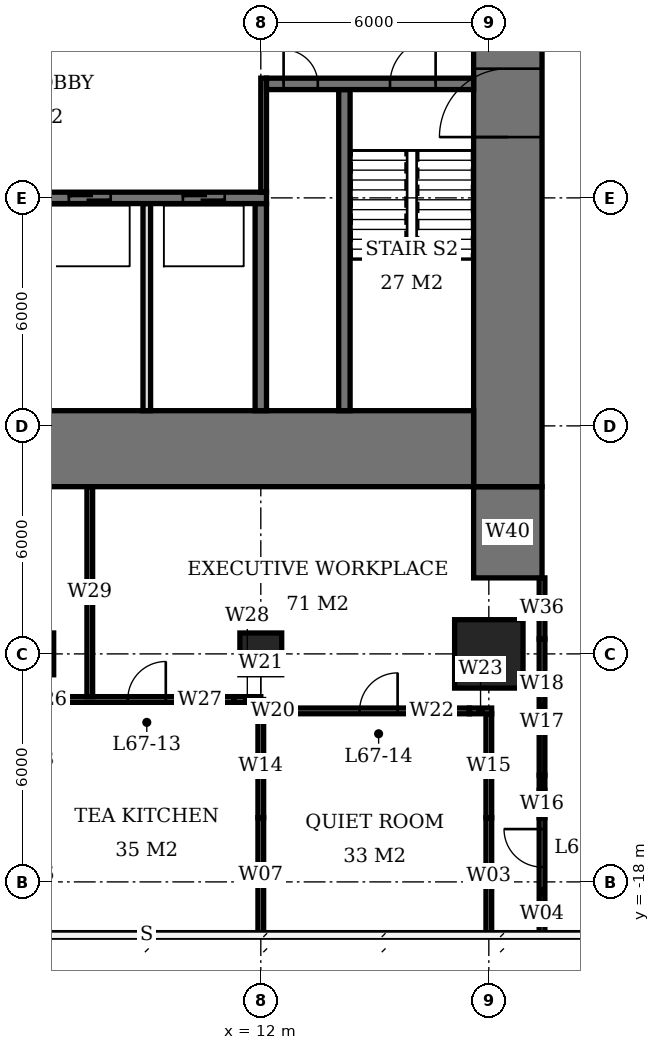
"""IFC4 building model, lengths in metres.
Left out: names, types, materials, properties, quantities, classifications, styles, units other than length and angle.
Written with IfcOpenShell. Run it as: python <this file> out.ifc"""

import sys

from ifc_helpers import new_model, si_unit, direction, frame, frame_2d, origin, origin_2d, place, context, subcontext, project, spatial, rectangle, extrude, element, fill, save


model = new_model("IFC4")
c1 = context("Model", 3, precision=1e-05, world=origin(), true_north=direction((0.0, 1.0)))
c2 = subcontext(c1, "Body", "Model", "MODEL_VIEW")
j1 = project(units=[si_unit("LENGTHUNIT", "METRE"), si_unit("PLANEANGLEUNIT", "RADIAN")], contexts=[c1])
p1 = place(None, origin())
s1 = spatial("IfcSite", under=j1, at=p1, CompositionType="ELEMENT")
p2 = place(p1, origin())
s2 = spatial("IfcBuilding", under=s1, at=p2, CompositionType="ELEMENT")
p3 = place(p2, frame((0.0, 0.0, 272.3)))
s3 = spatial("IfcBuildingStorey", under=s2, at=p3, CompositionType="ELEMENT", Elevation=272.3)
for number, where, z_axis, x_axis in (
    (1, (6.0, -12.0, 0.0), (0.0, 0.0, 1.0), (1.0, 0.0, 0.0)),
    (2, (12.0, -12.0, 0.0), (0.0, 0.0, 1.0), (1.0, 0.0, 0.0)),
):
    element("IfcColumn", number, at=place(p3, frame(where, z_axis=z_axis, x_axis=x_axis)), inside=s3, PredefinedType="COLUMN", context=c2, shape_type="SweptSolid", body=[
        extrude(rectangle(XDim=1.1, YDim=1.1, at=origin_2d()), origin(), (0.0, 0.0, 1.0), 3.9),
    ])
p4 = place(p3, frame((18.0, -12.0, 0.0), z_axis=(0.0, 0.0, 1.0), x_axis=(1.0, 0.0, 0.0)))
e3 = element("IfcColumn", 3, at=p4, inside=s3, PredefinedType="COLUMN", context=c2, shape_type="SweptSolid", body=[
    extrude(rectangle(XDim=1.8, YDim=1.8, at=origin_2d()), origin(), (0.0, 0.0, 1.0), 3.9),
])
p5 = place(p3, frame((-5.6, -6.6, 0.0), z_axis=(0.0, 0.0, 1.0), x_axis=(1.0, 0.0, 0.0)))
e4 = element("IfcWall", 4, at=p5, inside=s3, PredefinedType="SHEAR", context=c2, shape_type="SweptSolid", body=[
    extrude(rectangle(XDim=23.2, YDim=2.0, at=frame_2d((11.6, 0.0))), origin(), (0.0, 0.0, 1.0), 3.9),
])
p6 = place(p3, frame((18.5, -7.6, 0.0), z_axis=(0.0, 0.0, 1.0), x_axis=(0.0, 1.0, 0.0)))
e5 = element("IfcWall", 5, at=p6, inside=s3, PredefinedType="SHEAR", context=c2, shape_type="SweptSolid", body=[
    extrude(rectangle(XDim=21.2, YDim=1.8, at=frame_2d((10.6, 0.0))), origin(), (0.0, 0.0, 1.0), 3.9),
])
p7 = place(p6, frame((9.2, 0.0, 0.0)))
e6 = element("IfcOpeningElement", 6, at=p7, cuts=e5, PredefinedType="OPENING", context=c2, shape_type="SweptSolid", body=[
    extrude(rectangle(XDim=1.8, YDim=2.4, at=frame_2d((0.9, 1.2))), frame((0.0, 0.91, 0.0), z_axis=(0.0, -1.0, 0.0), x_axis=(1.0, 0.0, 0.0)), (0.0, 0.0, 1.0), 1.82),
])
p8 = place(p3, frame((18.5, -10.0, 0.0), z_axis=(0.0, 0.0, 1.0), x_axis=(0.0, 1.0, 0.0)))
e7 = element("IfcWall", 7, at=p8, inside=s3, PredefinedType="SHEAR", context=c2, shape_type="SweptSolid", body=[
    extrude(rectangle(XDim=2.4, YDim=1.8, at=frame_2d((1.2, 0.0))), origin(), (0.0, 0.0, 1.0), 3.9),
])
p9 = place(p3, frame((-5.6, 0.0, 0.0), z_axis=(0.0, 0.0, 1.0), x_axis=(1.0, 0.0, 0.0)))
e8 = element("IfcWall", 8, at=p9, inside=s3, PredefinedType="SHEAR", context=c2, shape_type="SweptSolid", body=[
    extrude(rectangle(XDim=17.75, YDim=0.3, at=frame_2d((8.875, 0.0))), origin(), (0.0, 0.0, 1.0), 3.9),
])
p10 = place(p9, frame((0.6, 0.0, 0.0)))
e9 = element("IfcOpeningElement", 9, at=p10, cuts=e8, PredefinedType="OPENING", context=c2, shape_type="SweptSolid", body=[
    extrude(rectangle(XDim=0.9, YDim=2.1, at=frame_2d((0.45, 1.05))), frame((0.0, 0.16, 0.0), z_axis=(0.0, -1.0, 0.0), x_axis=(1.0, 0.0, 0.0)), (0.0, 0.0, 1.0), 0.32),
])
p11 = place(p9, frame((9.6, 0.0, 0.0)))
e10 = element("IfcOpeningElement", 10, at=p11, cuts=e8, PredefinedType="OPENING", context=c2, shape_type="SweptSolid", body=[
    extrude(rectangle(XDim=1.0, YDim=2.1, at=frame_2d((0.5, 1.05))), frame((0.0, 0.16, 0.0), z_axis=(0.0, -1.0, 0.0), x_axis=(1.0, 0.0, 0.0)), (0.0, 0.0, 1.0), 0.32),
])
p12 = place(p9, frame((12.55, 0.0, 0.0)))
e11 = element("IfcOpeningElement", 11, at=p12, cuts=e8, PredefinedType="OPENING", context=c2, shape_type="SweptSolid", body=[
    extrude(rectangle(XDim=1.1, YDim=2.1, at=frame_2d((0.55, 1.05))), frame((0.0, 0.16, 0.0), z_axis=(0.0, -1.0, 0.0), x_axis=(1.0, 0.0, 0.0)), (0.0, 0.0, 1.0), 0.32),
])
p13 = place(p9, frame((15.55, 0.0, 0.0)))
e12 = element("IfcOpeningElement", 12, at=p13, cuts=e8, PredefinedType="OPENING", context=c2, shape_type="SweptSolid", body=[
    extrude(rectangle(XDim=1.1, YDim=2.1, at=frame_2d((0.55, 1.05))), frame((0.0, 0.16, 0.0), z_axis=(0.0, -1.0, 0.0), x_axis=(1.0, 0.0, 0.0)), (0.0, 0.0, 1.0), 0.32),
])
p14 = place(p3, frame((12.15, 3.0, 0.0), z_axis=(0.0, 0.0, 1.0), x_axis=(1.0, 0.0, 0.0)))
e13 = element("IfcWall", 13, at=p14, inside=s3, PredefinedType="SHEAR", context=c2, shape_type="SweptSolid", body=[
    extrude(rectangle(XDim=5.45, YDim=0.3, at=frame_2d((2.725, 0.0))), origin(), (0.0, 0.0, 1.0), 3.9),
])
p15 = place(p14, frame((3.25, 0.0, 0.0)))
e14 = element("IfcOpeningElement", 14, at=p15, cuts=e13, PredefinedType="OPENING", context=c2, shape_type="SweptSolid", body=[
    extrude(rectangle(XDim=1.2, YDim=2.1, at=frame_2d((0.6, 1.05))), frame((0.0, 0.16, 0.0), z_axis=(0.0, -1.0, 0.0), x_axis=(1.0, 0.0, 0.0)), (0.0, 0.0, 1.0), 0.32),
])
p16 = place(p14, frame((0.45, 0.0, 0.0)))
e15 = element("IfcOpeningElement", 15, at=p16, cuts=e13, PredefinedType="OPENING", context=c2, shape_type="SweptSolid", body=[
    extrude(rectangle(XDim=0.9, YDim=2.1, at=frame_2d((0.45, 1.05))), frame((0.0, 0.16, 0.0), z_axis=(0.0, -1.0, 0.0), x_axis=(1.0, 0.0, 0.0)), (0.0, 0.0, 1.0), 0.32),
])
p17 = place(p3, frame((12.0, -5.6, 0.0), z_axis=(0.0, 0.0, 1.0), x_axis=(0.0, 1.0, 0.0)))
e16 = element("IfcWall", 16, at=p17, inside=s3, PredefinedType="SHEAR", context=c2, shape_type="SweptSolid", body=[
    extrude(rectangle(XDim=5.45, YDim=0.3, at=frame_2d((2.725, 0.0))), origin(), (0.0, 0.0, 1.0), 3.9),
])
p18 = place(p3, frame((14.2, -5.6, 0.0), z_axis=(0.0, 0.0, 1.0), x_axis=(0.0, 1.0, 0.0)))
e17 = element("IfcWall", 17, at=p18, inside=s3, PredefinedType="SHEAR", context=c2, shape_type="SweptSolid", body=[
    extrude(rectangle(XDim=8.45, YDim=0.3, at=frame_2d((4.225, 0.0))), origin(), (0.0, 0.0, 1.0), 3.9),
])
p19 = place(p3, frame((9.0, -5.6, 0.0), z_axis=(0.0, 0.0, 1.0), x_axis=(0.0, 1.0, 0.0)))
e18 = element("IfcWall", 18, at=p19, inside=s3, PredefinedType="SOLIDWALL", context=c2, shape_type="SweptSolid", body=[
    extrude(rectangle(XDim=5.45, YDim=0.2, at=frame_2d((2.725, 0.0))), origin(), (0.0, 0.0, 1.0), 3.9),
])
p20 = place(p3, frame((11.925, -13.5, 0.0), z_axis=(0.0, 0.0, 1.0), x_axis=(1.0, 0.0, 0.0)))
e19 = element("IfcWall", 19, at=p20, inside=s3, PredefinedType="PARTITIONING", context=c2, shape_type="SweptSolid", body=[
    extrude(rectangle(XDim=0.785, YDim=0.15, at=frame_2d((0.393, 0.0))), origin(), (0.0, 0.0, 1.0), 2.65),
])
p21 = place(p3, frame((12.71, -13.5, 0.0), z_axis=(0.0, 0.0, 1.0), x_axis=(1.0, 0.0, 0.0)))
e20 = element("IfcWall", 20, at=p21, inside=s3, PredefinedType="PARTITIONING", context=c2, shape_type="SweptSolid", body=[
    extrude(rectangle(XDim=4.78, YDim=0.15, at=frame_2d((2.39, 0.0))), origin(), (0.0, 0.0, 1.0), 3.65),
])
p22 = place(p21, frame((1.89, 0.0, 0.0)))
e21 = element("IfcOpeningElement", 21, at=p22, cuts=e20, PredefinedType="OPENING", context=c2, shape_type="SweptSolid", body=[
    extrude(rectangle(XDim=1.0, YDim=2.4, at=frame_2d((0.5, 1.2))), frame((0.0, 0.085, 0.0), z_axis=(0.0, -1.0, 0.0), x_axis=(1.0, 0.0, 0.0)), (0.0, 0.0, 1.0), 0.17),
])
p23 = place(p3, frame((17.49, -13.5, 0.0), z_axis=(0.0, 0.0, 1.0), x_axis=(1.0, 0.0, 0.0)))
e22 = element("IfcWall", 22, at=p23, inside=s3, PredefinedType="PARTITIONING", context=c2, shape_type="SweptSolid", body=[
    extrude(rectangle(XDim=0.585, YDim=0.15, at=frame_2d((0.292, 0.0))), origin(), (0.0, 0.0, 1.0), 2.65),
])
p24 = place(p3, frame((5.925, -13.2, 0.0), z_axis=(0.0, 0.0, 1.0), x_axis=(1.0, 0.0, 0.0)))
e23 = element("IfcWall", 23, at=p24, inside=s3, PredefinedType="PARTITIONING", context=c2, shape_type="SweptSolid", body=[
    extrude(rectangle(XDim=0.785, YDim=0.15, at=frame_2d((0.393, 0.0))), origin(), (0.0, 0.0, 1.0), 2.65),
])
p25 = place(p3, frame((6.71, -13.2, 0.0), z_axis=(0.0, 0.0, 1.0), x_axis=(1.0, 0.0, 0.0)))
e24 = element("IfcWall", 24, at=p25, inside=s3, PredefinedType="PARTITIONING", context=c2, shape_type="SweptSolid", body=[
    extrude(rectangle(XDim=4.58, YDim=0.15, at=frame_2d((2.29, 0.0))), origin(), (0.0, 0.0, 1.0), 3.65),
])
p26 = place(p25, frame((1.79, 0.0, 0.0)))
e25 = element("IfcOpeningElement", 25, at=p26, cuts=e24, PredefinedType="OPENING", context=c2, shape_type="SweptSolid", body=[
    extrude(rectangle(XDim=1.0, YDim=2.4, at=frame_2d((0.5, 1.2))), frame((0.0, 0.085, 0.0), z_axis=(0.0, -1.0, 0.0), x_axis=(1.0, 0.0, 0.0)), (0.0, 0.0, 1.0), 0.17),
])
p27 = place(p3, frame((11.29, -13.2, 0.0), z_axis=(0.0, 0.0, 1.0), x_axis=(1.0, 0.0, 0.0)))
e26 = element("IfcWall", 26, at=p27, inside=s3, PredefinedType="PARTITIONING", context=c2, shape_type="SweptSolid", body=[
    extrude(rectangle(XDim=0.71, YDim=0.15, at=frame_2d((0.355, 0.0))), origin(), (0.0, 0.0, 1.0), 2.65),
])
p28 = place(p3, frame((12.0, -19.35, 0.0), z_axis=(0.0, 0.0, 1.0), x_axis=(0.0, 1.0, 0.0)))
e27 = element("IfcWall", 27, at=p28, inside=s3, PredefinedType="PARTITIONING", context=c2, shape_type="SweptSolid", body=[
    extrude(rectangle(XDim=3.04, YDim=0.15, at=frame_2d((1.52, 0.0))), origin(), (0.0, 0.0, 1.0), 3.65),
])
p29 = place(p3, frame((12.0, -16.31, 0.0), z_axis=(0.0, 0.0, 1.0), x_axis=(0.0, 1.0, 0.0)))
e28 = element("IfcWall", 28, at=p29, inside=s3, PredefinedType="PARTITIONING", context=c2, shape_type="SweptSolid", body=[
    extrude(rectangle(XDim=2.735, YDim=0.15, at=frame_2d((1.368, 0.0))), origin(), (0.0, 0.0, 1.0), 2.65),
])
p30 = place(p3, frame((12.0, -13.5, 0.0), z_axis=(0.0, 0.0, 1.0), x_axis=(0.0, 1.0, 0.0)))
e29 = element("IfcWall", 29, at=p30, inside=s3, PredefinedType="PARTITIONING", context=c2, shape_type="SweptSolid", body=[
    extrude(rectangle(XDim=0.3, YDim=0.15, at=frame_2d((0.15, 0.0))), origin(), (0.0, 0.0, 1.0), 2.65),
])
p31 = place(p3, frame((18.0, -19.375, 0.0), z_axis=(0.0, 0.0, 1.0), x_axis=(0.0, 1.0, 0.0)))
e30 = element("IfcWall", 30, at=p31, inside=s3, PredefinedType="PARTITIONING", context=c2, shape_type="SweptSolid", body=[
    extrude(rectangle(XDim=3.065, YDim=0.15, at=frame_2d((1.532, 0.0))), origin(), (0.0, 0.0, 1.0), 3.65),
])
p32 = place(p3, frame((18.0, -16.31, 0.0), z_axis=(0.0, 0.0, 1.0), x_axis=(0.0, 1.0, 0.0)))
e31 = element("IfcWall", 31, at=p32, inside=s3, PredefinedType="PARTITIONING", context=c2, shape_type="SweptSolid", body=[
    extrude(rectangle(XDim=2.735, YDim=0.15, at=frame_2d((1.368, 0.0))), origin(), (0.0, 0.0, 1.0), 2.65),
])
p33 = place(p3, frame((7.5, -13.125, 0.0), z_axis=(0.0, 0.0, 1.0), x_axis=(0.0, 1.0, 0.0)))
e32 = element("IfcWall", 32, at=p33, inside=s3, PredefinedType="PARTITIONING", context=c2, shape_type="SweptSolid", body=[
    extrude(rectangle(XDim=5.525, YDim=0.15, at=frame_2d((2.762, 0.0))), origin(), (0.0, 0.0, 1.0), 3.65),
])
p34 = place(p3, frame((19.4, -19.375, 0.0), z_axis=(0.0, 0.0, 1.0), x_axis=(0.0, 1.0, 0.0)))
e33 = element("IfcWall", 33, at=p34, inside=s3, PredefinedType="PARTITIONING", context=c2, shape_type="SweptSolid", body=[
    extrude(rectangle(XDim=3.065, YDim=0.15, at=frame_2d((1.532, 0.0))), origin(), (0.0, 0.0, 1.0), 3.65),
])
p35 = place(p34, frame((1.765, 0.0, 0.0)))
e34 = element("IfcOpeningElement", 34, at=p35, cuts=e33, PredefinedType="OPENING", context=c2, shape_type="SweptSolid", body=[
    extrude(rectangle(XDim=1.0, YDim=2.4, at=frame_2d((0.5, 1.2))), frame((0.0, 0.085, 0.0), z_axis=(0.0, -1.0, 0.0), x_axis=(1.0, 0.0, 0.0)), (0.0, 0.0, 1.0), 0.17),
])
p36 = place(p3, frame((19.4, -16.31, 0.0), z_axis=(0.0, 0.0, 1.0), x_axis=(0.0, 1.0, 0.0)))
e35 = element("IfcWall", 35, at=p36, inside=s3, PredefinedType="PARTITIONING", context=c2, shape_type="SweptSolid", body=[
    extrude(rectangle(XDim=0.72, YDim=0.15, at=frame_2d((0.36, 0.0))), origin(), (0.0, 0.0, 1.0), 2.65),
])
p37 = place(p3, frame((19.4, -15.59, 0.0), z_axis=(0.0, 0.0, 1.0), x_axis=(0.0, 1.0, 0.0)))
e36 = element("IfcWall", 36, at=p37, inside=s3, PredefinedType="PARTITIONING", context=c2, shape_type="SweptSolid", body=[
    extrude(rectangle(XDim=0.398, YDim=0.15, at=frame_2d((0.199, 0.0))), origin(), (0.0, 0.0, 1.0), 3.65),
])
p38 = place(p3, frame((19.4, -15.192, 0.0), z_axis=(0.0, 0.0, 1.0), x_axis=(0.0, 1.0, 0.0)))
e37 = element("IfcWall", 37, at=p38, inside=s3, PredefinedType="PARTITIONING", context=c2, shape_type="SweptSolid", body=[
    extrude(rectangle(XDim=3.584, YDim=0.15, at=frame_2d((1.792, 0.0))), origin(), (0.0, 0.0, 1.0), 2.65),
])
p39 = place(p3, frame((19.4, -11.608, 0.0), z_axis=(0.0, 0.0, 1.0), x_axis=(0.0, 1.0, 0.0)))
e38 = element("IfcWall", 38, at=p39, inside=s3, PredefinedType="PARTITIONING", context=c2, shape_type="SweptSolid", body=[
    extrude(rectangle(XDim=1.608, YDim=0.15, at=frame_2d((0.804, 0.0))), origin(), (0.0, 0.0, 1.0), 3.65),
])
p40 = place(p3, frame((12.075, 0.15, 0.0), z_axis=(0.0, 0.0, 1.0), x_axis=(0.0, 1.0, 0.0)))
e39 = element("IfcWall", 39, at=p40, inside=s3, PredefinedType="PARTITIONING", context=c2, shape_type="SweptSolid", body=[
    extrude(rectangle(XDim=3.0, YDim=0.15, at=frame_2d((1.5, 0.0))), origin(), (0.0, 0.0, 1.0), 3.65),
])
p41 = place(p7, origin())
e40 = element("IfcDoor", 40, at=p41, inside=s3, OperationType="DOUBLE_DOOR_SINGLE_SWING", PredefinedType="DOOR", context=c2, shape_type="SweptSolid", body=[
    extrude(rectangle(XDim=1.8, YDim=2.4, at=frame_2d((0.9, 1.2))), frame((0.0, 0.025, 0.0), z_axis=(0.0, -1.0, 0.0), x_axis=(1.0, 0.0, 0.0)), (0.0, 0.0, 1.0), 0.05),
])
fill(e6, e40)
p42 = place(p15, origin())
e41 = element("IfcDoor", 41, at=p42, inside=s3, OperationType="SINGLE_SWING_RIGHT", PredefinedType="DOOR", context=c2, shape_type="SweptSolid", body=[
    extrude(rectangle(XDim=1.2, YDim=2.1, at=frame_2d((0.6, 1.05))), frame((0.0, 0.025, 0.0), z_axis=(0.0, -1.0, 0.0), x_axis=(1.0, 0.0, 0.0)), (0.0, 0.0, 1.0), 0.05),
])
fill(e14, e41)
p43 = place(p16, origin())
e42 = element("IfcDoor", 42, at=p43, inside=s3, OperationType="SINGLE_SWING_LEFT", PredefinedType="DOOR", context=c2, shape_type="SweptSolid", body=[
    extrude(rectangle(XDim=0.9, YDim=2.1, at=frame_2d((0.45, 1.05))), frame((0.0, 0.025, 0.0), z_axis=(0.0, -1.0, 0.0), x_axis=(1.0, 0.0, 0.0)), (0.0, 0.0, 1.0), 0.05),
])
fill(e15, e42)
p44 = place(p12, origin())
e43 = element("IfcDoor", 43, at=p44, inside=s3, OperationType="DOUBLE_DOOR_SLIDING", PredefinedType="USERDEFINED", context=c2, shape_type="SweptSolid", body=[
    extrude(rectangle(XDim=1.1, YDim=2.1, at=frame_2d((0.55, 1.05))), frame((0.0, 0.025, 0.0), z_axis=(0.0, -1.0, 0.0), x_axis=(1.0, 0.0, 0.0)), (0.0, 0.0, 1.0), 0.05),
])
fill(e11, e43)
p45 = place(p13, origin())
e44 = element("IfcDoor", 44, at=p45, inside=s3, OperationType="DOUBLE_DOOR_SLIDING", PredefinedType="USERDEFINED", context=c2, shape_type="SweptSolid", body=[
    extrude(rectangle(XDim=1.1, YDim=2.1, at=frame_2d((0.55, 1.05))), frame((0.0, 0.025, 0.0), z_axis=(0.0, -1.0, 0.0), x_axis=(1.0, 0.0, 0.0)), (0.0, 0.0, 1.0), 0.05),
])
fill(e12, e44)
p46 = place(p26, origin())
e45 = element("IfcDoor", 45, at=p46, inside=s3, OperationType="SINGLE_SWING_RIGHT", PredefinedType="DOOR", context=c2, shape_type="SweptSolid", body=[
    extrude(rectangle(XDim=1.0, YDim=2.4, at=frame_2d((0.5, 1.2))), frame((0.0, 0.025, 0.0), z_axis=(0.0, -1.0, 0.0), x_axis=(1.0, 0.0, 0.0)), (0.0, 0.0, 1.0), 0.05),
])
fill(e25, e45)
p47 = place(p22, origin())
e46 = element("IfcDoor", 46, at=p47, inside=s3, OperationType="SINGLE_SWING_RIGHT", PredefinedType="DOOR", context=c2, shape_type="SweptSolid", body=[
    extrude(rectangle(XDim=1.0, YDim=2.4, at=frame_2d((0.5, 1.2))), frame((0.0, 0.025, 0.0), z_axis=(0.0, -1.0, 0.0), x_axis=(1.0, 0.0, 0.0)), (0.0, 0.0, 1.0), 0.05),
])
fill(e21, e46)
p48 = place(p35, origin())
e47 = element("IfcDoor", 47, at=p48, inside=s3, OperationType="SINGLE_SWING_RIGHT", PredefinedType="DOOR", context=c2, shape_type="SweptSolid", body=[
    extrude(rectangle(XDim=1.0, YDim=2.4, at=frame_2d((0.5, 1.2))), frame((0.0, 0.025, 0.0), z_axis=(0.0, -1.0, 0.0), x_axis=(1.0, 0.0, 0.0)), (0.0, 0.0, 1.0), 0.05),
])
fill(e34, e47)
save(model, sys.argv[1])
